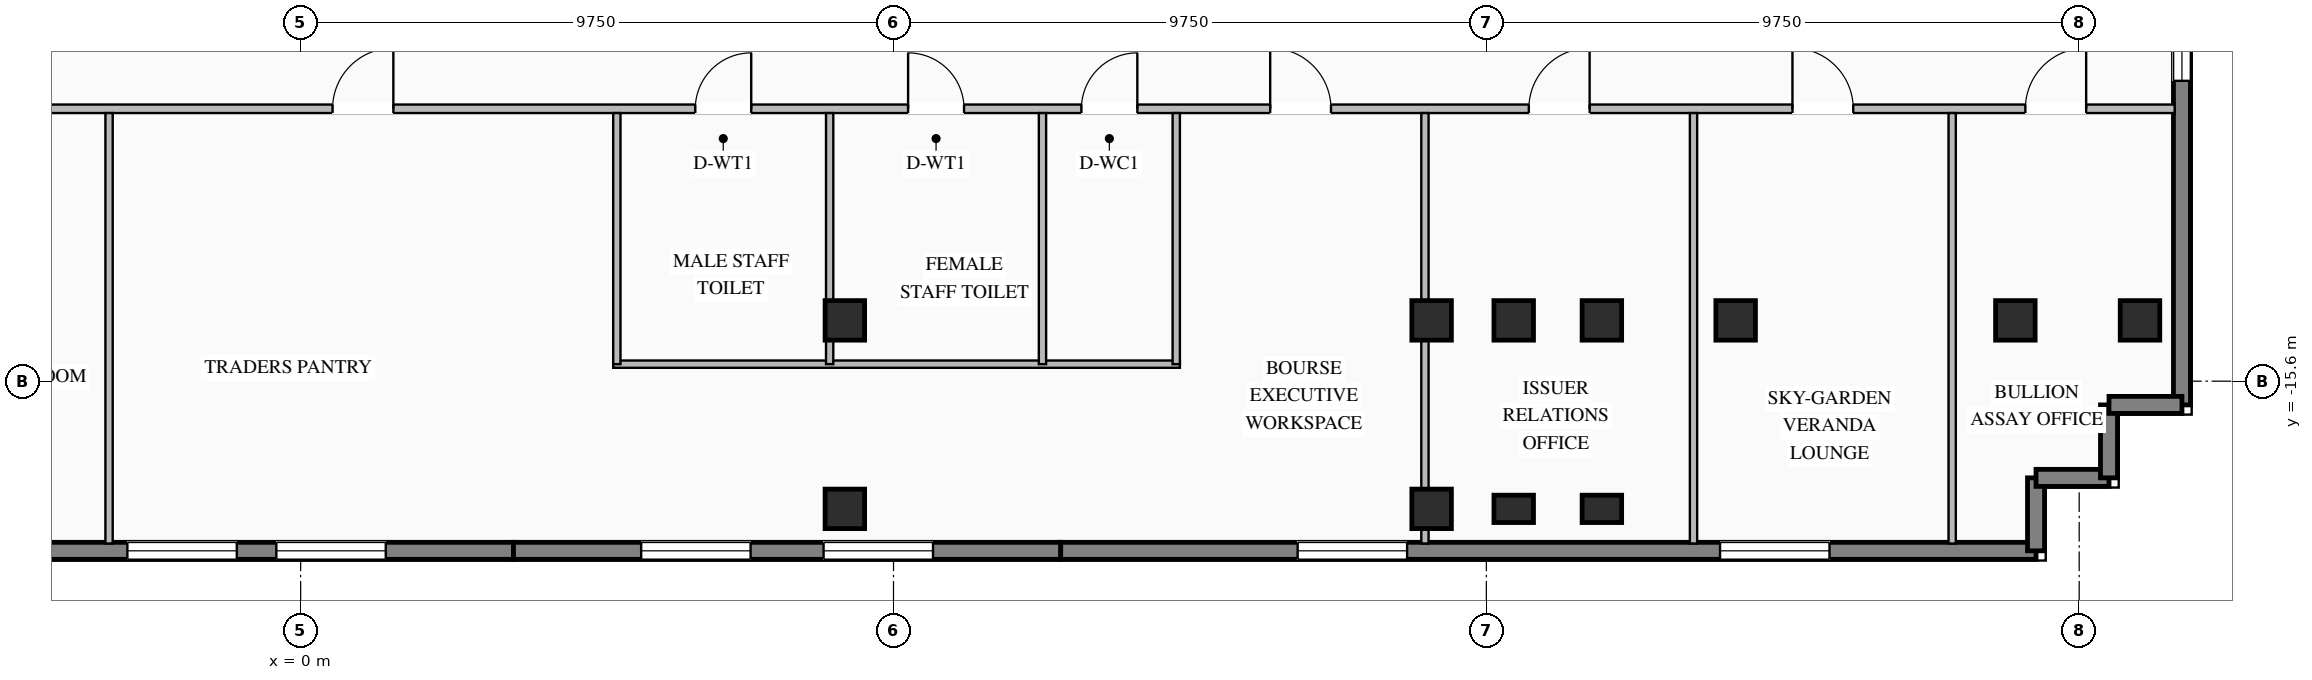
"""IFC4 building model, lengths in metres.
Left out: names, types, materials, properties, quantities, classifications, styles, units other than length and angle.
Written with IfcOpenShell. Run it as: python <this file> out.ifc"""

import sys

from ifc_helpers import new_model, si_unit, direction, frame, frame_2d, origin, origin_2d, place, context, subcontext, project, spatial, rectangle, i_section, extrude, element, fill, save


model = new_model("IFC4")
c1 = context("Model", 3, precision=1e-05, world=origin(), true_north=direction((0.0, 1.0)))
c2 = subcontext(c1, "Body", "Model", "MODEL_VIEW")
j1 = project(units=[si_unit("LENGTHUNIT", "METRE"), si_unit("PLANEANGLEUNIT", "RADIAN")], contexts=[c1])
p1 = place(None, origin())
s1 = spatial("IfcSite", under=j1, at=p1, CompositionType="ELEMENT")
p2 = place(p1, origin())
s2 = spatial("IfcBuilding", under=s1, at=p2, CompositionType="ELEMENT")
p3 = place(p2, frame((0.0, 0.0, 131.2)))
s3 = spatial("IfcBuildingStorey", under=s2, at=p3, CompositionType="ELEMENT", Elevation=131.2)
for number, where, z_axis, x_axis in (
    (1, (8.95, -14.6, 0.0), (0.0, 0.0, 1.0), (1.0, 0.0, 0.0)),
    (2, (18.6, -14.6, 0.0), (0.0, 0.0, 1.0), (1.0, 0.0, 0.0)),
    (3, (19.95, -14.6, 0.0), (0.0, 0.0, 1.0), (1.0, 0.0, 0.0)),
    (4, (21.4, -14.6, 0.0), (0.0, 0.0, 1.0), (1.0, 0.0, 0.0)),
    (5, (23.6, -14.6, 0.0), (0.0, 0.0, 1.0), (1.0, 0.0, 0.0)),
    (6, (28.2, -14.6, 0.0), (0.0, 0.0, 1.0), (1.0, 0.0, 0.0)),
    (7, (8.95, -17.7, 0.0), (0.0, 0.0, 1.0), (1.0, 0.0, 0.0)),
    (8, (18.6, -17.7, 0.0), (0.0, 0.0, 1.0), (1.0, 0.0, 0.0)),
    (9, (30.25, -14.6, 0.0), (0.0, 0.0, 1.0), (1.0, 0.0, 0.0)),
):
    element("IfcColumn", number, at=place(p3, frame(where, z_axis=z_axis, x_axis=x_axis)), inside=s3, PredefinedType="COLUMN", context=c2, shape_type="SweptSolid", body=[
        extrude(i_section(OverallWidth=0.65, OverallDepth=0.65, WebThickness=0.028, FlangeThickness=0.04, at=origin_2d()), origin(), (0.0, 0.0, 1.0), 3.45),
    ])
for number, where, z_axis, x_axis in (
    (10, (19.95, -17.7, 0.0), (0.0, 0.0, 1.0), (1.0, 0.0, 0.0)),
    (11, (21.4, -17.7, 0.0), (0.0, 0.0, 1.0), (1.0, 0.0, 0.0)),
):
    element("IfcColumn", number, at=place(p3, frame(where, z_axis=z_axis, x_axis=x_axis)), inside=s3, PredefinedType="PILASTER", context=c2, shape_type="SweptSolid", body=[
        extrude(rectangle(XDim=0.65, YDim=0.45, at=origin_2d()), origin(), (0.0, 0.0, 1.0), 3.45),
    ])
p4 = place(p3, frame((3.5, -18.39, 0.0), z_axis=(0.0, 0.0, 1.0), x_axis=(-1.0, 0.0, 0.0)))
e12 = element("IfcWall", 12, at=p4, inside=s3, PredefinedType="STANDARD", context=c2, shape_type="SweptSolid", body=[
    extrude(rectangle(XDim=9.0, YDim=0.28, at=frame_2d((4.5, 0.0))), origin(), (0.0, 0.0, 1.0), 3.25),
])
p5 = place(p4, frame((2.1, 0.0, 0.76)))
e13 = element("IfcOpeningElement", 13, at=p5, cuts=e12, PredefinedType="OPENING", context=c2, shape_type="SweptSolid", body=[
    extrude(rectangle(XDim=1.8, YDim=1.95, at=frame_2d((0.9, 0.975))), frame((0.0, 0.15, 0.0), z_axis=(0.0, -1.0, 0.0), x_axis=(1.0, 0.0, 0.0)), (0.0, 0.0, 1.0), 0.3),
])
p6 = place(p4, frame((4.55, 0.0, 0.76)))
e14 = element("IfcOpeningElement", 14, at=p6, cuts=e12, PredefinedType="OPENING", context=c2, shape_type="SweptSolid", body=[
    extrude(rectangle(XDim=1.8, YDim=1.95, at=frame_2d((0.9, 0.975))), frame((0.0, 0.15, 0.0), z_axis=(0.0, -1.0, 0.0), x_axis=(1.0, 0.0, 0.0)), (0.0, 0.0, 1.0), 0.3),
])
p7 = place(p3, frame((12.5, -18.39, 0.0), z_axis=(0.0, 0.0, 1.0), x_axis=(-1.0, 0.0, 0.0)))
e15 = element("IfcWall", 15, at=p7, inside=s3, PredefinedType="STANDARD", context=c2, shape_type="SweptSolid", body=[
    extrude(rectangle(XDim=9.0, YDim=0.28, at=frame_2d((4.5, 0.0))), origin(), (0.0, 0.0, 1.0), 3.25),
])
p8 = place(p7, frame((2.1, 0.0, 0.76)))
e16 = element("IfcOpeningElement", 16, at=p8, cuts=e15, PredefinedType="OPENING", context=c2, shape_type="SweptSolid", body=[
    extrude(rectangle(XDim=1.8, YDim=1.95, at=frame_2d((0.9, 0.975))), frame((0.0, 0.15, 0.0), z_axis=(0.0, -1.0, 0.0), x_axis=(1.0, 0.0, 0.0)), (0.0, 0.0, 1.0), 0.3),
])
p9 = place(p7, frame((5.1, 0.0, 0.76)))
e17 = element("IfcOpeningElement", 17, at=p9, cuts=e15, PredefinedType="OPENING", context=c2, shape_type="SweptSolid", body=[
    extrude(rectangle(XDim=1.8, YDim=1.95, at=frame_2d((0.9, 0.975))), frame((0.0, 0.15, 0.0), z_axis=(0.0, -1.0, 0.0), x_axis=(1.0, 0.0, 0.0)), (0.0, 0.0, 1.0), 0.3),
])
p10 = place(p3, frame((28.54, -18.39, 0.0), z_axis=(0.0, 0.0, 1.0), x_axis=(-1.0, 0.0, 0.0)))
e18 = element("IfcWall", 18, at=p10, inside=s3, PredefinedType="STANDARD", context=c2, shape_type="SweptSolid", body=[
    extrude(rectangle(XDim=16.04, YDim=0.28, at=frame_2d((8.02, 0.0))), origin(), (0.0, 0.0, 1.0), 3.25),
])
p11 = place(p10, frame((3.397, 0.0, 0.76)))
e19 = element("IfcOpeningElement", 19, at=p11, cuts=e18, PredefinedType="OPENING", context=c2, shape_type="SweptSolid", body=[
    extrude(rectangle(XDim=1.8, YDim=1.95, at=frame_2d((0.9, 0.975))), frame((0.0, 0.15, 0.0), z_axis=(0.0, -1.0, 0.0), x_axis=(1.0, 0.0, 0.0)), (0.0, 0.0, 1.0), 0.3),
])
p12 = place(p10, frame((10.343, 0.0, 0.76)))
e20 = element("IfcOpeningElement", 20, at=p12, cuts=e18, PredefinedType="OPENING", context=c2, shape_type="SweptSolid", body=[
    extrude(rectangle(XDim=1.8, YDim=1.95, at=frame_2d((0.9, 0.975))), frame((0.0, 0.15, 0.0), z_axis=(0.0, -1.0, 0.0), x_axis=(1.0, 0.0, 0.0)), (0.0, 0.0, 1.0), 0.3),
])
p13 = place(p3, frame((30.94, 1.8, 0.0), z_axis=(0.0, 0.0, 1.0), x_axis=(0.0, -1.0, 0.0)))
e21 = element("IfcWall", 21, at=p13, inside=s3, PredefinedType="STANDARD", context=c2, shape_type="SweptSolid", body=[
    extrude(rectangle(XDim=17.79, YDim=0.28, at=frame_2d((8.895, 0.0))), origin(), (0.0, 0.0, 1.0), 3.25),
])
p14 = place(p13, frame((5.33, 0.0, 0.76)))
e22 = element("IfcOpeningElement", 22, at=p14, cuts=e21, PredefinedType="OPENING", context=c2, shape_type="SweptSolid", body=[
    extrude(rectangle(XDim=1.2, YDim=1.95, at=frame_2d((0.6, 0.975))), frame((0.0, 0.15, 0.0), z_axis=(0.0, -1.0, 0.0), x_axis=(1.0, 0.0, 0.0)), (0.0, 0.0, 1.0), 0.3),
])
p15 = place(p13, frame((11.26, 0.0, 0.76)))
e23 = element("IfcOpeningElement", 23, at=p15, cuts=e21, PredefinedType="OPENING", context=c2, shape_type="SweptSolid", body=[
    extrude(rectangle(XDim=1.2, YDim=1.95, at=frame_2d((0.6, 0.975))), frame((0.0, 0.15, 0.0), z_axis=(0.0, -1.0, 0.0), x_axis=(1.0, 0.0, 0.0)), (0.0, 0.0, 1.0), 0.3),
])
for number, where, z_axis, x_axis in (
    (24, (28.54, -18.39, 0.0), (0.0, 0.0, 1.0), (0.0, 1.0, 0.0)),
    (25, (28.54, -17.19, 0.0), (0.0, 0.0, 1.0), (1.0, 0.0, 0.0)),
    (26, (29.74, -17.19, 0.0), (0.0, 0.0, 1.0), (0.0, 1.0, 0.0)),
    (27, (29.74, -15.99, 0.0), (0.0, 0.0, 1.0), (1.0, 0.0, 0.0)),
):
    element("IfcWall", number, at=place(p3, frame(where, z_axis=z_axis, x_axis=x_axis)), inside=s3, PredefinedType="STANDARD", context=c2, shape_type="SweptSolid", body=[
        extrude(rectangle(XDim=1.2, YDim=0.28, at=frame_2d((0.6, 0.0))), origin(), (0.0, 0.0, 1.0), 3.25),
    ])
p16 = place(p3, frame((-32.82, -11.12, 0.0), z_axis=(0.0, 0.0, 1.0), x_axis=(1.0, 0.0, 0.0)))
e28 = element("IfcWall", 28, at=p16, inside=s3, PredefinedType="STANDARD", context=c2, shape_type="SweptSolid", body=[
    extrude(rectangle(XDim=63.64, YDim=0.14, at=frame_2d((31.82, 0.0))), origin(), (0.0, 0.0, 1.0), 3.25),
])
p17 = place(p16, frame((39.31, 0.0, 0.0)))
e29 = element("IfcOpeningElement", 29, at=p17, cuts=e28, PredefinedType="OPENING", context=c2, shape_type="SweptSolid", body=[
    extrude(rectangle(XDim=0.92, YDim=2.08, at=frame_2d((0.46, 1.04))), frame((0.0, 0.08, 0.0), z_axis=(0.0, -1.0, 0.0), x_axis=(1.0, 0.0, 0.0)), (0.0, 0.0, 1.0), 0.16),
])
p18 = place(p16, frame((42.81, 0.0, 0.0)))
e30 = element("IfcOpeningElement", 30, at=p18, cuts=e28, PredefinedType="OPENING", context=c2, shape_type="SweptSolid", body=[
    extrude(rectangle(XDim=0.92, YDim=2.08, at=frame_2d((0.46, 1.04))), frame((0.0, 0.08, 0.0), z_axis=(0.0, -1.0, 0.0), x_axis=(1.0, 0.0, 0.0)), (0.0, 0.0, 1.0), 0.16),
])
p19 = place(p16, frame((45.66, 0.0, 0.0)))
e31 = element("IfcOpeningElement", 31, at=p19, cuts=e28, PredefinedType="OPENING", context=c2, shape_type="SweptSolid", body=[
    extrude(rectangle(XDim=0.92, YDim=2.08, at=frame_2d((0.46, 1.04))), frame((0.0, 0.08, 0.0), z_axis=(0.0, -1.0, 0.0), x_axis=(1.0, 0.0, 0.0)), (0.0, 0.0, 1.0), 0.16),
])
p20 = place(p16, frame((4.401, 0.0, 0.0)))
e32 = element("IfcOpeningElement", 32, at=p20, cuts=e28, PredefinedType="OPENING", context=c2, shape_type="SweptSolid", body=[
    extrude(rectangle(XDim=1.0, YDim=2.08, at=frame_2d((0.5, 1.04))), frame((0.0, 0.08, 0.0), z_axis=(0.0, -1.0, 0.0), x_axis=(1.0, 0.0, 0.0)), (0.0, 0.0, 1.0), 0.16),
])
p21 = place(p16, frame((14.175, 0.0, 0.0)))
e33 = element("IfcOpeningElement", 33, at=p21, cuts=e28, PredefinedType="OPENING", context=c2, shape_type="SweptSolid", body=[
    extrude(rectangle(XDim=1.0, YDim=2.08, at=frame_2d((0.5, 1.04))), frame((0.0, 0.08, 0.0), z_axis=(0.0, -1.0, 0.0), x_axis=(1.0, 0.0, 0.0)), (0.0, 0.0, 1.0), 0.16),
])
p22 = place(p16, frame((24.234, 0.0, 0.0)))
e34 = element("IfcOpeningElement", 34, at=p22, cuts=e28, PredefinedType="OPENING", context=c2, shape_type="SweptSolid", body=[
    extrude(rectangle(XDim=1.0, YDim=2.08, at=frame_2d((0.5, 1.04))), frame((0.0, 0.08, 0.0), z_axis=(0.0, -1.0, 0.0), x_axis=(1.0, 0.0, 0.0)), (0.0, 0.0, 1.0), 0.16),
])
p23 = place(p16, frame((33.344, 0.0, 0.0)))
e35 = element("IfcOpeningElement", 35, at=p23, cuts=e28, PredefinedType="OPENING", context=c2, shape_type="SweptSolid", body=[
    extrude(rectangle(XDim=1.0, YDim=2.08, at=frame_2d((0.5, 1.04))), frame((0.0, 0.08, 0.0), z_axis=(0.0, -1.0, 0.0), x_axis=(1.0, 0.0, 0.0)), (0.0, 0.0, 1.0), 0.16),
])
p24 = place(p16, frame((48.765, 0.0, 0.0)))
e36 = element("IfcOpeningElement", 36, at=p24, cuts=e28, PredefinedType="OPENING", context=c2, shape_type="SweptSolid", body=[
    extrude(rectangle(XDim=1.0, YDim=2.08, at=frame_2d((0.5, 1.04))), frame((0.0, 0.08, 0.0), z_axis=(0.0, -1.0, 0.0), x_axis=(1.0, 0.0, 0.0)), (0.0, 0.0, 1.0), 0.16),
])
p25 = place(p16, frame((53.019, 0.0, 0.0)))
e37 = element("IfcOpeningElement", 37, at=p25, cuts=e28, PredefinedType="OPENING", context=c2, shape_type="SweptSolid", body=[
    extrude(rectangle(XDim=1.0, YDim=2.08, at=frame_2d((0.5, 1.04))), frame((0.0, 0.08, 0.0), z_axis=(0.0, -1.0, 0.0), x_axis=(1.0, 0.0, 0.0)), (0.0, 0.0, 1.0), 0.16),
])
p26 = place(p16, frame((57.354, 0.0, 0.0)))
e38 = element("IfcOpeningElement", 38, at=p26, cuts=e28, PredefinedType="OPENING", context=c2, shape_type="SweptSolid", body=[
    extrude(rectangle(XDim=1.0, YDim=2.08, at=frame_2d((0.5, 1.04))), frame((0.0, 0.08, 0.0), z_axis=(0.0, -1.0, 0.0), x_axis=(1.0, 0.0, 0.0)), (0.0, 0.0, 1.0), 0.16),
])
p27 = place(p16, frame((61.185, 0.0, 0.0)))
e39 = element("IfcOpeningElement", 39, at=p27, cuts=e28, PredefinedType="OPENING", context=c2, shape_type="SweptSolid", body=[
    extrude(rectangle(XDim=1.0, YDim=2.08, at=frame_2d((0.5, 1.04))), frame((0.0, 0.08, 0.0), z_axis=(0.0, -1.0, 0.0), x_axis=(1.0, 0.0, 0.0)), (0.0, 0.0, 1.0), 0.16),
])
p28 = place(p3, frame((5.14, -15.32, 0.0), z_axis=(0.0, 0.0, 1.0), x_axis=(1.0, 0.0, 0.0)))
e40 = element("IfcWall", 40, at=p28, inside=s3, PredefinedType="STANDARD", context=c2, shape_type="SweptSolid", body=[
    extrude(rectangle(XDim=9.32, YDim=0.12, at=frame_2d((4.66, 0.0))), origin(), (0.0, 0.0, 1.0), 3.25),
])
for number, where, z_axis, x_axis in (
    (41, (5.2, -15.32, 0.0), (0.0, 0.0, 1.0), (0.0, 1.0, 0.0)),
    (42, (8.7, -15.32, 0.0), (0.0, 0.0, 1.0), (0.0, 1.0, 0.0)),
    (43, (12.2, -15.32, 0.0), (0.0, 0.0, 1.0), (0.0, 1.0, 0.0)),
    (44, (14.4, -15.32, 0.0), (0.0, 0.0, 1.0), (0.0, 1.0, 0.0)),
):
    element("IfcWall", number, at=place(p3, frame(where, z_axis=z_axis, x_axis=x_axis)), inside=s3, PredefinedType="STANDARD", context=c2, shape_type="SweptSolid", body=[
        extrude(rectangle(XDim=4.13, YDim=0.12, at=frame_2d((2.065, 0.0))), origin(), (0.0, 0.0, 1.0), 3.25),
    ])
p29 = place(p3, frame((-3.151, -18.27, 0.0), z_axis=(0.0, 0.0, 1.0), x_axis=(0.0, 1.0, 0.0)))
e45 = element("IfcWall", 45, at=p29, inside=s3, PredefinedType="STANDARD", context=c2, shape_type="SweptSolid", body=[
    extrude(rectangle(XDim=7.08, YDim=0.12, at=frame_2d((3.54, 0.0))), origin(), (0.0, 0.0, 1.0), 3.25),
])
p30 = place(p3, frame((18.49, -18.27, 0.0), z_axis=(0.0, 0.0, 1.0), x_axis=(0.0, 1.0, 0.0)))
e46 = element("IfcWall", 46, at=p30, inside=s3, PredefinedType="STANDARD", context=c2, shape_type="SweptSolid", body=[
    extrude(rectangle(XDim=7.08, YDim=0.12, at=frame_2d((3.54, 0.0))), origin(), (0.0, 0.0, 1.0), 2.645),
])
for number, where, z_axis, x_axis in (
    (47, (22.907, -18.27, 0.0), (0.0, 0.0, 1.0), (0.0, 1.0, 0.0)),
    (48, (27.161, -18.27, 0.0), (0.0, 0.0, 1.0), (0.0, 1.0, 0.0)),
):
    element("IfcWall", number, at=place(p3, frame(where, z_axis=z_axis, x_axis=x_axis)), inside=s3, PredefinedType="STANDARD", context=c2, shape_type="SweptSolid", body=[
        extrude(rectangle(XDim=7.08, YDim=0.12, at=frame_2d((3.54, 0.0))), origin(), (0.0, 0.0, 1.0), 3.25),
    ])
p31 = place(p5, origin())
e49 = element("IfcWindow", 49, at=p31, inside=s3, PartitioningType="SINGLE_PANEL", PredefinedType="WINDOW", context=c2, shape_type="SweptSolid", body=[
    extrude(rectangle(XDim=1.8, YDim=1.95, at=frame_2d((0.9, 0.975))), frame((0.0, 0.03, 0.0), z_axis=(0.0, -1.0, 0.0), x_axis=(1.0, 0.0, 0.0)), (0.0, 0.0, 1.0), 0.06),
])
fill(e13, e49)
p32 = place(p6, origin())
e50 = element("IfcWindow", 50, at=p32, inside=s3, PartitioningType="SINGLE_PANEL", PredefinedType="WINDOW", context=c2, shape_type="SweptSolid", body=[
    extrude(rectangle(XDim=1.8, YDim=1.95, at=frame_2d((0.9, 0.975))), frame((0.0, 0.03, 0.0), z_axis=(0.0, -1.0, 0.0), x_axis=(1.0, 0.0, 0.0)), (0.0, 0.0, 1.0), 0.06),
])
fill(e14, e50)
p33 = place(p8, origin())
e51 = element("IfcWindow", 51, at=p33, inside=s3, PartitioningType="SINGLE_PANEL", PredefinedType="WINDOW", context=c2, shape_type="SweptSolid", body=[
    extrude(rectangle(XDim=1.8, YDim=1.95, at=frame_2d((0.9, 0.975))), frame((0.0, 0.03, 0.0), z_axis=(0.0, -1.0, 0.0), x_axis=(1.0, 0.0, 0.0)), (0.0, 0.0, 1.0), 0.06),
])
fill(e16, e51)
p34 = place(p9, origin())
e52 = element("IfcWindow", 52, at=p34, inside=s3, PartitioningType="SINGLE_PANEL", PredefinedType="WINDOW", context=c2, shape_type="SweptSolid", body=[
    extrude(rectangle(XDim=1.8, YDim=1.95, at=frame_2d((0.9, 0.975))), frame((0.0, 0.03, 0.0), z_axis=(0.0, -1.0, 0.0), x_axis=(1.0, 0.0, 0.0)), (0.0, 0.0, 1.0), 0.06),
])
fill(e17, e52)
p35 = place(p11, origin())
e53 = element("IfcWindow", 53, at=p35, inside=s3, PartitioningType="SINGLE_PANEL", PredefinedType="WINDOW", context=c2, shape_type="SweptSolid", body=[
    extrude(rectangle(XDim=1.8, YDim=1.95, at=frame_2d((0.9, 0.975))), frame((0.0, 0.03, 0.0), z_axis=(0.0, -1.0, 0.0), x_axis=(1.0, 0.0, 0.0)), (0.0, 0.0, 1.0), 0.06),
])
fill(e19, e53)
p36 = place(p12, origin())
e54 = element("IfcWindow", 54, at=p36, inside=s3, PartitioningType="SINGLE_PANEL", PredefinedType="WINDOW", context=c2, shape_type="SweptSolid", body=[
    extrude(rectangle(XDim=1.8, YDim=1.95, at=frame_2d((0.9, 0.975))), frame((0.0, 0.03, 0.0), z_axis=(0.0, -1.0, 0.0), x_axis=(1.0, 0.0, 0.0)), (0.0, 0.0, 1.0), 0.06),
])
fill(e20, e54)
p37 = place(p15, origin())
e55 = element("IfcWindow", 55, at=p37, inside=s3, PartitioningType="SINGLE_PANEL", PredefinedType="WINDOW", context=c2, shape_type="SweptSolid", body=[
    extrude(rectangle(XDim=1.2, YDim=1.95, at=frame_2d((0.6, 0.975))), frame((0.0, 0.03, 0.0), z_axis=(0.0, -1.0, 0.0), x_axis=(1.0, 0.0, 0.0)), (0.0, 0.0, 1.0), 0.06),
])
fill(e23, e55)
p38 = place(p17, origin())
e56 = element("IfcDoor", 56, at=p38, inside=s3, OperationType="SINGLE_SWING_RIGHT", PredefinedType="DOOR", context=c2, shape_type="SweptSolid", body=[
    extrude(rectangle(XDim=0.92, YDim=2.08, at=frame_2d((0.46, 1.04))), frame((0.0, 0.025, 0.0), z_axis=(0.0, -1.0, 0.0), x_axis=(1.0, 0.0, 0.0)), (0.0, 0.0, 1.0), 0.05),
])
fill(e29, e56)
p39 = place(p18, origin())
e57 = element("IfcDoor", 57, at=p39, inside=s3, OperationType="SINGLE_SWING_LEFT", PredefinedType="DOOR", context=c2, shape_type="SweptSolid", body=[
    extrude(rectangle(XDim=0.92, YDim=2.08, at=frame_2d((0.46, 1.04))), frame((0.0, 0.025, 0.0), z_axis=(0.0, -1.0, 0.0), x_axis=(1.0, 0.0, 0.0)), (0.0, 0.0, 1.0), 0.05),
])
fill(e30, e57)
p40 = place(p19, origin())
e58 = element("IfcDoor", 58, at=p40, inside=s3, OperationType="SINGLE_SWING_RIGHT", PredefinedType="DOOR", context=c2, shape_type="SweptSolid", body=[
    extrude(rectangle(XDim=0.92, YDim=2.08, at=frame_2d((0.46, 1.04))), frame((0.0, 0.025, 0.0), z_axis=(0.0, -1.0, 0.0), x_axis=(1.0, 0.0, 0.0)), (0.0, 0.0, 1.0), 0.05),
])
fill(e31, e58)
p41 = place(p23, origin())
e59 = element("IfcDoor", 59, at=p41, inside=s3, OperationType="SINGLE_SWING_RIGHT", PredefinedType="DOOR", context=c2, shape_type="SweptSolid", body=[
    extrude(rectangle(XDim=1.0, YDim=2.08, at=frame_2d((0.5, 1.04))), frame((0.0, 0.025, 0.0), z_axis=(0.0, -1.0, 0.0), x_axis=(1.0, 0.0, 0.0)), (0.0, 0.0, 1.0), 0.05),
])
fill(e35, e59)
p42 = place(p24, origin())
e60 = element("IfcDoor", 60, at=p42, inside=s3, OperationType="SINGLE_SWING_LEFT", PredefinedType="DOOR", context=c2, shape_type="SweptSolid", body=[
    extrude(rectangle(XDim=1.0, YDim=2.08, at=frame_2d((0.5, 1.04))), frame((0.0, 0.025, 0.0), z_axis=(0.0, -1.0, 0.0), x_axis=(1.0, 0.0, 0.0)), (0.0, 0.0, 1.0), 0.05),
])
fill(e36, e60)
p43 = place(p25, origin())
e61 = element("IfcDoor", 61, at=p43, inside=s3, OperationType="SINGLE_SWING_RIGHT", PredefinedType="DOOR", context=c2, shape_type="SweptSolid", body=[
    extrude(rectangle(XDim=1.0, YDim=2.08, at=frame_2d((0.5, 1.04))), frame((0.0, 0.025, 0.0), z_axis=(0.0, -1.0, 0.0), x_axis=(1.0, 0.0, 0.0)), (0.0, 0.0, 1.0), 0.05),
])
fill(e37, e61)
p44 = place(p26, origin())
e62 = element("IfcDoor", 62, at=p44, inside=s3, OperationType="SINGLE_SWING_LEFT", PredefinedType="DOOR", context=c2, shape_type="SweptSolid", body=[
    extrude(rectangle(XDim=1.0, YDim=2.08, at=frame_2d((0.5, 1.04))), frame((0.0, 0.025, 0.0), z_axis=(0.0, -1.0, 0.0), x_axis=(1.0, 0.0, 0.0)), (0.0, 0.0, 1.0), 0.05),
])
fill(e38, e62)
p45 = place(p27, origin())
e63 = element("IfcDoor", 63, at=p45, inside=s3, OperationType="SINGLE_SWING_RIGHT", PredefinedType="DOOR", context=c2, shape_type="SweptSolid", body=[
    extrude(rectangle(XDim=1.0, YDim=2.08, at=frame_2d((0.5, 1.04))), frame((0.0, 0.025, 0.0), z_axis=(0.0, -1.0, 0.0), x_axis=(1.0, 0.0, 0.0)), (0.0, 0.0, 1.0), 0.05),
])
fill(e39, e63)
save(model, sys.argv[1])
